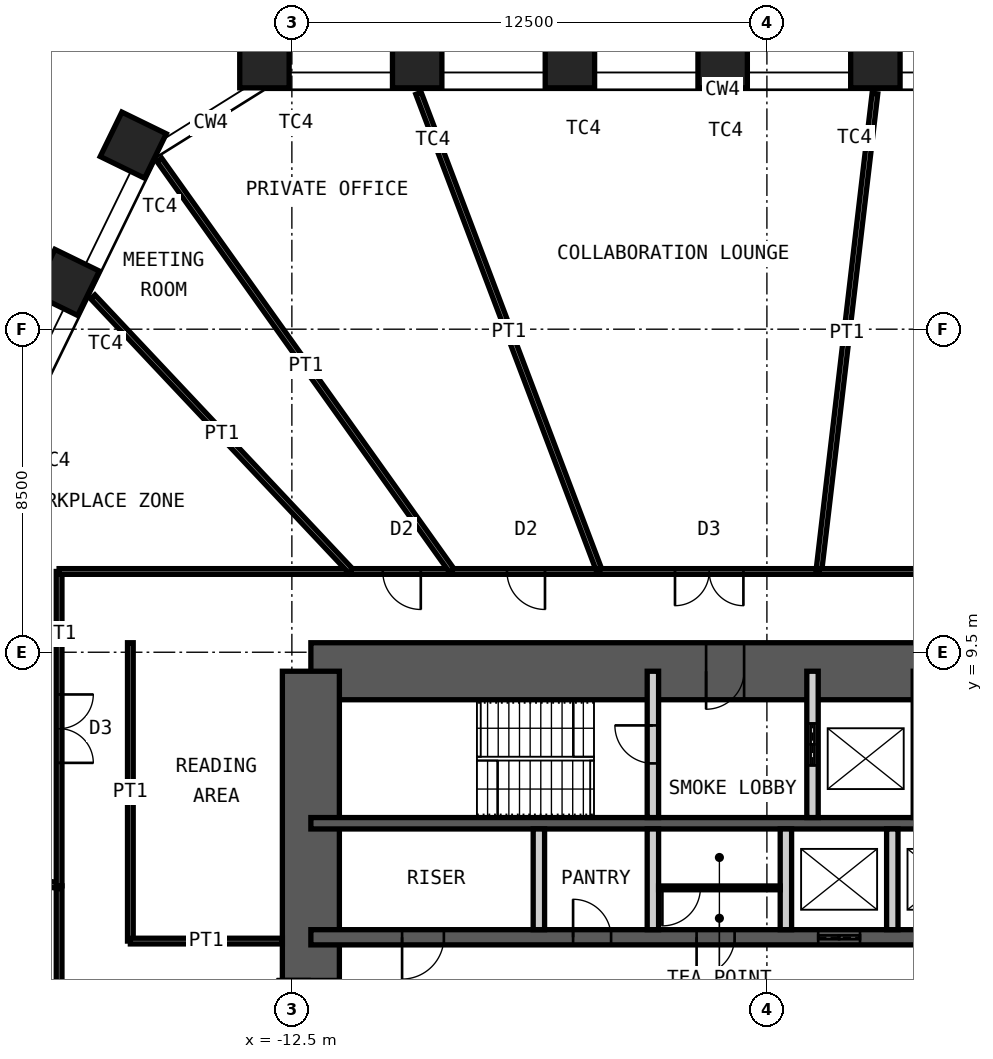
"""IFC4 building model, lengths in metres.
Left out: names, types, materials, properties, quantities, classifications, styles, units other than length and angle.
Written with IfcOpenShell. Run it as: python <this file> out.ifc"""

import sys

from ifc_helpers import new_model, si_unit, direction, frame, frame_2d, origin, origin_2d, place, context, subcontext, project, spatial, rectangle, hollow_rectangle, extrude, element, fill, save


model = new_model("IFC4")
c1 = context("Model", 3, precision=1e-05, world=origin(), true_north=direction((0.0, 1.0)))
c2 = subcontext(c1, "Body", "Model", "MODEL_VIEW")
j1 = project(units=[si_unit("LENGTHUNIT", "METRE"), si_unit("PLANEANGLEUNIT", "RADIAN")], contexts=[c1])
p1 = place(None, origin())
s1 = spatial("IfcSite", under=j1, at=p1, CompositionType="ELEMENT")
p2 = place(p1, origin())
s2 = spatial("IfcBuilding", under=s1, at=p2, CompositionType="ELEMENT")
p3 = place(p2, frame((0.0, 0.0, 149.2)))
s3 = spatial("IfcBuildingStorey", under=s2, at=p3, CompositionType="ELEMENT", Elevation=149.2)
for number, where, z_axis, x_axis in (
    (1, (-13.222, 25.0, 0.0), (0.0, 0.0, 1.0), (-1.0, 0.0, 0.0)),
    (2, (-9.203, 25.0, 0.0), (0.0, 0.0, 1.0), (-1.0, 0.0, 0.0)),
    (3, (-5.184, 25.0, 0.0), (0.0, 0.0, 1.0), (-1.0, 0.0, 0.0)),
    (4, (-1.165, 25.0, 0.0), (0.0, 0.0, 1.0), (-1.0, 0.0, 0.0)),
    (5, (2.854, 25.0, 0.0), (0.0, 0.0, 1.0), (-1.0, 0.0, 0.0)),
    (6, (-18.436, 19.23, 0.0), (0.0, 0.0, 1.0), (-0.438, -0.899, 0.0)),
    (7, (-16.674, 22.843, 0.0), (0.0, 0.0, 1.0), (-0.438, -0.899, 0.0)),
):
    element("IfcColumn", number, at=place(p3, frame(where, z_axis=z_axis, x_axis=x_axis)), inside=s3, PredefinedType="COLUMN", context=c2, shape_type="SweptSolid", body=[
        extrude(hollow_rectangle(XDim=1.3, YDim=1.3, WallThickness=0.1, at=origin_2d()), origin(), (0.0, 0.0, 1.0), 4.2),
    ])
p4 = place(p3, frame((-12.0, 9.0, 0.0), z_axis=(0.0, 0.0, 1.0), x_axis=(1.0, 0.0, 0.0)))
e8 = element("IfcWall", 8, at=p4, inside=s3, PredefinedType="SHEAR", context=c2, shape_type="SweptSolid", body=[
    extrude(rectangle(XDim=24.0, YDim=1.5, at=frame_2d((12.0, 0.0))), origin(), (0.0, 0.0, 1.0), 4.2),
])
p5 = place(p4, frame((10.4, 0.0, 0.0)))
e9 = element("IfcOpeningElement", 9, at=p5, cuts=e8, PredefinedType="OPENING", context=c2, shape_type="SweptSolid", body=[
    extrude(rectangle(XDim=1.0, YDim=2.1, at=frame_2d((0.5, 1.05))), frame((0.0, 0.76, 0.0), z_axis=(0.0, -1.0, 0.0), x_axis=(1.0, 0.0, 0.0)), (0.0, 0.0, 1.0), 1.52),
])
p6 = place(p4, frame((17.6, 0.0, 0.0)))
e10 = element("IfcOpeningElement", 10, at=p6, cuts=e8, PredefinedType="OPENING", context=c2, shape_type="SweptSolid", body=[
    extrude(rectangle(XDim=0.9, YDim=2.1, at=frame_2d((0.45, 1.05))), frame((0.0, 0.76, 0.0), z_axis=(0.0, -1.0, 0.0), x_axis=(1.0, 0.0, 0.0)), (0.0, 0.0, 1.0), 1.52),
])
p7 = place(p4, frame((21.9, 0.0, 0.0)))
e11 = element("IfcOpeningElement", 11, at=p7, cuts=e8, PredefinedType="OPENING", context=c2, shape_type="SweptSolid", body=[
    extrude(rectangle(XDim=0.9, YDim=2.1, at=frame_2d((0.45, 1.05))), frame((0.0, 0.76, 0.0), z_axis=(0.0, -1.0, 0.0), x_axis=(1.0, 0.0, 0.0)), (0.0, 0.0, 1.0), 1.52),
])
p8 = place(p3, frame((-12.0, -9.0, 0.0), z_axis=(0.0, 0.0, 1.0), x_axis=(0.0, 1.0, 0.0)))
e12 = element("IfcWall", 12, at=p8, inside=s3, PredefinedType="SHEAR", context=c2, shape_type="SweptSolid", body=[
    extrude(rectangle(XDim=18.0, YDim=1.5, at=frame_2d((9.0, 0.0))), origin(), (0.0, 0.0, 1.0), 4.2),
])
p9 = place(p8, frame((8.1, 0.0, 0.0)))
e13 = element("IfcOpeningElement", 13, at=p9, cuts=e12, PredefinedType="OPENING", context=c2, shape_type="SweptSolid", body=[
    extrude(rectangle(XDim=1.8, YDim=2.1, at=frame_2d((0.9, 1.05))), frame((0.0, 0.76, 0.0), z_axis=(0.0, -1.0, 0.0), x_axis=(1.0, 0.0, 0.0)), (0.0, 0.0, 1.0), 1.52),
])
p10 = place(p3, frame((-12.0, 5.0, 0.0), z_axis=(0.0, 0.0, 1.0), x_axis=(1.0, 0.0, 0.0)))
e14 = element("IfcWall", 14, at=p10, inside=s3, PredefinedType="SHEAR", context=c2, shape_type="SweptSolid", body=[
    extrude(rectangle(XDim=24.0, YDim=0.3, at=frame_2d((12.0, 0.0))), origin(), (0.0, 0.0, 1.0), 4.2),
])
p11 = place(p3, frame((-12.0, 2.0, 0.0), z_axis=(0.0, 0.0, 1.0), x_axis=(1.0, 0.0, 0.0)))
e15 = element("IfcWall", 15, at=p11, inside=s3, PredefinedType="SHEAR", context=c2, shape_type="SweptSolid", body=[
    extrude(rectangle(XDim=24.0, YDim=0.4, at=frame_2d((12.0, 0.0))), origin(), (0.0, 0.0, 1.0), 4.2),
])
p12 = place(p11, frame((2.4, 0.0, 0.0)))
e16 = element("IfcOpeningElement", 16, at=p12, cuts=e15, PredefinedType="OPENING", context=c2, shape_type="SweptSolid", body=[
    extrude(rectangle(XDim=1.1, YDim=2.1, at=frame_2d((0.55, 1.05))), frame((0.0, 0.21, 0.0), z_axis=(0.0, -1.0, 0.0), x_axis=(1.0, 0.0, 0.0)), (0.0, 0.0, 1.0), 0.42),
])
p13 = place(p11, frame((22.0, 0.0, 0.0)))
e17 = element("IfcOpeningElement", 17, at=p13, cuts=e15, PredefinedType="OPENING", context=c2, shape_type="SweptSolid", body=[
    extrude(rectangle(XDim=1.1, YDim=2.1, at=frame_2d((0.55, 1.05))), frame((0.0, 0.21, 0.0), z_axis=(0.0, -1.0, 0.0), x_axis=(1.0, 0.0, 0.0)), (0.0, 0.0, 1.0), 0.42),
])
p14 = place(p11, frame((10.15, 0.0, 0.0)))
e18 = element("IfcOpeningElement", 18, at=p14, cuts=e15, PredefinedType="OPENING", context=c2, shape_type="SweptSolid", body=[
    extrude(rectangle(XDim=1.0, YDim=2.1, at=frame_2d((0.5, 1.05))), frame((0.0, 0.21, 0.0), z_axis=(0.0, -1.0, 0.0), x_axis=(1.0, 0.0, 0.0)), (0.0, 0.0, 1.0), 0.42),
])
p15 = place(p11, frame((6.9, 0.0, 0.0)))
e19 = element("IfcOpeningElement", 19, at=p15, cuts=e15, PredefinedType="OPENING", context=c2, shape_type="SweptSolid", body=[
    extrude(rectangle(XDim=1.0, YDim=2.1, at=frame_2d((0.5, 1.05))), frame((0.0, 0.21, 0.0), z_axis=(0.0, -1.0, 0.0), x_axis=(1.0, 0.0, 0.0)), (0.0, 0.0, 1.0), 0.42),
])
p16 = place(p11, frame((13.35, 0.0, 0.0)))
e20 = element("IfcOpeningElement", 20, at=p16, cuts=e15, PredefinedType="OPENING", context=c2, shape_type="SweptSolid", body=[
    extrude(rectangle(XDim=1.1, YDim=2.4, at=frame_2d((0.55, 1.2))), frame((0.0, 0.21, 0.0), z_axis=(0.0, -1.0, 0.0), x_axis=(1.0, 0.0, 0.0)), (0.0, 0.0, 1.0), 0.42),
])
p17 = place(p11, frame((16.15, 0.0, 0.0)))
e21 = element("IfcOpeningElement", 21, at=p17, cuts=e15, PredefinedType="OPENING", context=c2, shape_type="SweptSolid", body=[
    extrude(rectangle(XDim=1.1, YDim=2.4, at=frame_2d((0.55, 1.2))), frame((0.0, 0.21, 0.0), z_axis=(0.0, -1.0, 0.0), x_axis=(1.0, 0.0, 0.0)), (0.0, 0.0, 1.0), 0.42),
])
p18 = place(p11, frame((18.95, 0.0, 0.0)))
e22 = element("IfcOpeningElement", 22, at=p18, cuts=e15, PredefinedType="OPENING", context=c2, shape_type="SweptSolid", body=[
    extrude(rectangle(XDim=1.1, YDim=2.4, at=frame_2d((0.55, 1.2))), frame((0.0, 0.21, 0.0), z_axis=(0.0, -1.0, 0.0), x_axis=(1.0, 0.0, 0.0)), (0.0, 0.0, 1.0), 0.42),
])
p19 = place(p3, frame((-3.0, 5.15, 0.0), z_axis=(0.0, 0.0, 1.0), x_axis=(0.0, 1.0, 0.0)))
e23 = element("IfcWall", 23, at=p19, inside=s3, PredefinedType="PARTITIONING", context=c2, shape_type="SweptSolid", body=[
    extrude(rectangle(XDim=3.85, YDim=0.3, at=frame_2d((1.925, 0.0))), origin(), (0.0, 0.0, 1.0), 3.98),
])
p20 = place(p19, frame((1.425, 0.0, 0.0)))
e24 = element("IfcOpeningElement", 24, at=p20, cuts=e23, PredefinedType="OPENING", context=c2, shape_type="SweptSolid", body=[
    extrude(rectangle(XDim=1.0, YDim=2.1, at=frame_2d((0.5, 1.05))), frame((0.0, 0.16, 0.0), z_axis=(0.0, -1.0, 0.0), x_axis=(1.0, 0.0, 0.0)), (0.0, 0.0, 1.0), 0.32),
])
p21 = place(p3, frame((1.2, 5.15, 0.0), z_axis=(0.0, 0.0, 1.0), x_axis=(0.0, 1.0, 0.0)))
e25 = element("IfcWall", 25, at=p21, inside=s3, PredefinedType="PARTITIONING", context=c2, shape_type="SweptSolid", body=[
    extrude(rectangle(XDim=3.85, YDim=0.3, at=frame_2d((1.925, 0.0))), origin(), (0.0, 0.0, 1.0), 3.98),
])
p22 = place(p21, frame((1.375, 0.0, 0.0)))
e26 = element("IfcOpeningElement", 26, at=p22, cuts=e25, PredefinedType="OPENING", context=c2, shape_type="SweptSolid", body=[
    extrude(rectangle(XDim=1.1, YDim=2.4, at=frame_2d((0.55, 1.2))), frame((0.0, 0.16, 0.0), z_axis=(0.0, -1.0, 0.0), x_axis=(1.0, 0.0, 0.0)), (0.0, 0.0, 1.0), 0.32),
])
p23 = place(p3, frame((4.0, 5.15, 0.0), z_axis=(0.0, 0.0, 1.0), x_axis=(0.0, 1.0, 0.0)))
e27 = element("IfcWall", 27, at=p23, inside=s3, PredefinedType="PARTITIONING", context=c2, shape_type="SweptSolid", body=[
    extrude(rectangle(XDim=3.85, YDim=0.3, at=frame_2d((1.925, 0.0))), origin(), (0.0, 0.0, 1.0), 3.98),
])
for number, where, z_axis, x_axis in (
    (28, (-6.0, 2.2, 0.0), (0.0, 0.0, 1.0), (0.0, 1.0, 0.0)),
    (29, (-3.0, 2.2, 0.0), (0.0, 0.0, 1.0), (0.0, 1.0, 0.0)),
    (30, (0.5, 2.2, 0.0), (0.0, 0.0, 1.0), (0.0, 1.0, 0.0)),
    (31, (3.3, 2.2, 0.0), (0.0, 0.0, 1.0), (0.0, 1.0, 0.0)),
):
    element("IfcWall", number, at=place(p3, frame(where, z_axis=z_axis, x_axis=x_axis)), inside=s3, PredefinedType="PARTITIONING", context=c2, shape_type="SweptSolid", body=[
        extrude(rectangle(XDim=2.65, YDim=0.3, at=frame_2d((1.325, 0.0))), origin(), (0.0, 0.0, 1.0), 3.98),
    ])
p24 = place(p3, frame((-2.85, 3.3, 0.0), z_axis=(0.0, 0.0, 1.0), x_axis=(1.0, 0.0, 0.0)))
e32 = element("IfcWall", 32, at=p24, inside=s3, PredefinedType="PARTITIONING", context=c2, shape_type="SweptSolid", body=[
    extrude(rectangle(XDim=3.2, YDim=0.1, at=frame_2d((1.6, 0.0))), origin(), (0.0, 0.0, 1.0), 3.98),
])
p25 = place(p24, frame((0.1, 0.0, 0.0)))
e33 = element("IfcOpeningElement", 33, at=p25, cuts=e32, PredefinedType="OPENING", context=c2, shape_type="SweptSolid", body=[
    extrude(rectangle(XDim=1.0, YDim=2.4, at=frame_2d((0.5, 1.2))), frame((0.0, 0.06, 0.0), z_axis=(0.0, -1.0, 0.0), x_axis=(1.0, 0.0, 0.0)), (0.0, 0.0, 1.0), 0.12),
])
p26 = place(p3, frame((-18.625, -4.715, 0.0), z_axis=(0.0, 0.0, 1.0), x_axis=(0.0, 1.0, 0.0)))
e34 = element("IfcWall", 34, at=p26, inside=s3, PredefinedType="PARTITIONING", context=c2, shape_type="SweptSolid", body=[
    extrude(rectangle(XDim=8.068, YDim=0.15, at=frame_2d((4.034, 0.0))), origin(), (0.0, 0.0, 1.0), 4.03),
])
p27 = place(p26, frame((3.534, 0.0, 0.0)))
e35 = element("IfcOpeningElement", 35, at=p27, cuts=e34, PredefinedType="OPENING", context=c2, shape_type="SweptSolid", body=[
    extrude(rectangle(XDim=1.0, YDim=2.4, at=frame_2d((0.5, 1.2))), frame((0.0, 0.085, 0.0), z_axis=(0.0, -1.0, 0.0), x_axis=(1.0, 0.0, 0.0)), (0.0, 0.0, 1.0), 0.17),
])
p28 = place(p3, frame((-24.755, 4.457, 0.0), z_axis=(0.0, 0.0, 1.0), x_axis=(0.984175122587, -0.177198555524, 0.0)))
e36 = element("IfcWall", 36, at=p28, inside=s3, PredefinedType="PARTITIONING", context=c2, shape_type="SweptSolid", body=[
    extrude(rectangle(XDim=6.229, YDim=0.15, at=frame_2d((3.115, 0.0))), origin(), (0.0, 0.0, 1.0), 3.33),
])
p29 = place(p3, frame((-18.625, 3.353, 0.0), z_axis=(0.0, 0.0, 1.0), x_axis=(0.0, 1.0, 0.0)))
e37 = element("IfcWall", 37, at=p29, inside=s3, PredefinedType="PARTITIONING", context=c2, shape_type="SweptSolid", body=[
    extrude(rectangle(XDim=8.272, YDim=0.15, at=frame_2d((4.136, 0.0))), origin(), (0.0, 0.0, 1.0), 4.03),
])
p30 = place(p29, frame((3.236, 0.0, 0.0)))
e38 = element("IfcOpeningElement", 38, at=p30, cuts=e37, PredefinedType="OPENING", context=c2, shape_type="SweptSolid", body=[
    extrude(rectangle(XDim=1.8, YDim=2.4, at=frame_2d((0.9, 1.2))), frame((0.0, 0.085, 0.0), z_axis=(0.0, -1.0, 0.0), x_axis=(1.0, 0.0, 0.0)), (0.0, 0.0, 1.0), 0.17),
])
p31 = place(p3, frame((-18.625, 11.625, 0.0), z_axis=(0.0, 0.0, 1.0), x_axis=(1.0, 0.0, 0.0)))
e39 = element("IfcWall", 39, at=p31, inside=s3, PredefinedType="PARTITIONING", context=c2, shape_type="SweptSolid", body=[
    extrude(rectangle(XDim=7.686, YDim=0.15, at=frame_2d((3.843, 0.0))), origin(), (0.0, 0.0, 1.0), 4.03),
])
p32 = place(p3, frame((-17.738, 18.851, 0.0), z_axis=(0.0, 0.0, 1.0), x_axis=(0.685286406267, -0.728273672039, 0.0)))
e40 = element("IfcWall", 40, at=p32, inside=s3, PredefinedType="PARTITIONING", context=c2, shape_type="SweptSolid", body=[
    extrude(rectangle(XDim=9.922, YDim=0.15, at=frame_2d((4.961, 0.0))), origin(), (0.0, 0.0, 1.0), 3.33),
])
p33 = place(p3, frame((-10.939, 11.625, 0.0), z_axis=(0.0, 0.0, 1.0), x_axis=(1.0, 0.0, 0.0)))
e41 = element("IfcWall", 41, at=p33, inside=s3, PredefinedType="PARTITIONING", context=c2, shape_type="SweptSolid", body=[
    extrude(rectangle(XDim=2.662, YDim=0.15, at=frame_2d((1.331, 0.0))), origin(), (0.0, 0.0, 1.0), 4.03),
])
p34 = place(p33, frame((0.831, 0.0, 0.0)))
e42 = element("IfcOpeningElement", 42, at=p34, cuts=e41, PredefinedType="OPENING", context=c2, shape_type="SweptSolid", body=[
    extrude(rectangle(XDim=1.0, YDim=2.4, at=frame_2d((0.5, 1.2))), frame((0.0, 0.085, 0.0), z_axis=(0.0, -1.0, 0.0), x_axis=(1.0, 0.0, 0.0)), (0.0, 0.0, 1.0), 0.17),
])
p35 = place(p3, frame((-15.987, 22.455, 0.0), z_axis=(0.0, 0.0, 1.0), x_axis=(0.579969304452, -0.814638328274, 0.0)))
e43 = element("IfcWall", 43, at=p35, inside=s3, PredefinedType="PARTITIONING", context=c2, shape_type="SweptSolid", body=[
    extrude(rectangle(XDim=13.294, YDim=0.15, at=frame_2d((6.647, 0.0))), origin(), (0.0, 0.0, 1.0), 2.93),
])
p36 = place(p3, frame((-8.277, 11.625, 0.0), z_axis=(0.0, 0.0, 1.0), x_axis=(1.0, 0.0, 0.0)))
e44 = element("IfcWall", 44, at=p36, inside=s3, PredefinedType="PARTITIONING", context=c2, shape_type="SweptSolid", body=[
    extrude(rectangle(XDim=3.874, YDim=0.15, at=frame_2d((1.937, 0.0))), origin(), (0.0, 0.0, 1.0), 4.03),
])
p37 = place(p36, frame((1.437, 0.0, 0.0)))
e45 = element("IfcOpeningElement", 45, at=p37, cuts=e44, PredefinedType="OPENING", context=c2, shape_type="SweptSolid", body=[
    extrude(rectangle(XDim=1.0, YDim=2.4, at=frame_2d((0.5, 1.2))), frame((0.0, 0.085, 0.0), z_axis=(0.0, -1.0, 0.0), x_axis=(1.0, 0.0, 0.0)), (0.0, 0.0, 1.0), 0.17),
])
p38 = place(p3, frame((-9.167, 24.207, 0.0), z_axis=(0.0, 0.0, 1.0), x_axis=(0.354156368181, -0.935186220427, 0.0)))
e46 = element("IfcWall", 46, at=p38, inside=s3, PredefinedType="PARTITIONING", context=c2, shape_type="SweptSolid", body=[
    extrude(rectangle(XDim=13.454, YDim=0.15, at=frame_2d((6.727, 0.0))), origin(), (0.0, 0.0, 1.0), 3.33),
])
p39 = place(p3, frame((-4.403, 11.625, 0.0), z_axis=(0.0, 0.0, 1.0), x_axis=(1.0, 0.0, 0.0)))
e47 = element("IfcWall", 47, at=p39, inside=s3, PredefinedType="PARTITIONING", context=c2, shape_type="SweptSolid", body=[
    extrude(rectangle(XDim=5.768, YDim=0.15, at=frame_2d((2.884, 0.0))), origin(), (0.0, 0.0, 1.0), 4.03),
])
p40 = place(p39, frame((1.984, 0.0, 0.0)))
e48 = element("IfcOpeningElement", 48, at=p40, cuts=e47, PredefinedType="OPENING", context=c2, shape_type="SweptSolid", body=[
    extrude(rectangle(XDim=1.8, YDim=2.4, at=frame_2d((0.9, 1.2))), frame((0.0, 0.085, 0.0), z_axis=(0.0, -1.0, 0.0), x_axis=(1.0, 0.0, 0.0)), (0.0, 0.0, 1.0), 0.17),
])
p41 = place(p3, frame((2.843, 24.201, 0.0), z_axis=(0.0, 0.0, 1.0), x_axis=(-0.116670084723, -0.993170726175, 0.0)))
e49 = element("IfcWall", 49, at=p41, inside=s3, PredefinedType="PARTITIONING", context=c2, shape_type="SweptSolid", body=[
    extrude(rectangle(XDim=12.662, YDim=0.15, at=frame_2d((6.331, 0.0))), origin(), (0.0, 0.0, 1.0), 3.33),
])
p42 = place(p3, frame((1.366, 11.625, 0.0), z_axis=(0.0, 0.0, 1.0), x_axis=(1.0, 0.0, 0.0)))
e50 = element("IfcWall", 50, at=p42, inside=s3, PredefinedType="PARTITIONING", context=c2, shape_type="SweptSolid", body=[
    extrude(rectangle(XDim=8.46, YDim=0.15, at=frame_2d((4.23, 0.0))), origin(), (0.0, 0.0, 1.0), 4.03),
])
p43 = place(p42, frame((3.33, 0.0, 0.0)))
e51 = element("IfcOpeningElement", 51, at=p43, cuts=e50, PredefinedType="OPENING", context=c2, shape_type="SweptSolid", body=[
    extrude(rectangle(XDim=1.8, YDim=2.4, at=frame_2d((0.9, 1.2))), frame((0.0, 0.085, 0.0), z_axis=(0.0, -1.0, 0.0), x_axis=(1.0, 0.0, 0.0)), (0.0, 0.0, 1.0), 0.17),
])
p44 = place(p3, frame((-16.75, 1.9, 0.0), z_axis=(0.0, 0.0, 1.0), x_axis=(0.0, 1.0, 0.0)))
e52 = element("IfcWall", 52, at=p44, inside=s3, PredefinedType="PARTITIONING", context=c2, shape_type="SweptSolid", body=[
    extrude(rectangle(XDim=7.85, YDim=0.15, at=frame_2d((3.925, 0.0))), origin(), (0.0, 0.0, 1.0), 4.03),
])
p45 = place(p3, frame((-12.75, 1.9, 0.0), z_axis=(0.0, 0.0, 1.0), x_axis=(-1.0, 0.0, 0.0)))
e53 = element("IfcWall", 53, at=p45, inside=s3, PredefinedType="PARTITIONING", context=c2, shape_type="SweptSolid", body=[
    extrude(rectangle(XDim=4.0, YDim=0.15, at=frame_2d((2.0, 0.0))), origin(), (0.0, 0.0, 1.0), 3.33),
])
p46 = place(p5, origin())
e54 = element("IfcDoor", 54, at=p46, inside=s3, OperationType="SINGLE_SWING_LEFT", PredefinedType="DOOR", context=c2, shape_type="SweptSolid", body=[
    extrude(rectangle(XDim=1.0, YDim=2.1, at=frame_2d((0.5, 1.05))), frame((0.0, 0.025, 0.0), z_axis=(0.0, -1.0, 0.0), x_axis=(1.0, 0.0, 0.0)), (0.0, 0.0, 1.0), 0.05),
])
fill(e9, e54)
p47 = place(p20, origin())
e55 = element("IfcDoor", 55, at=p47, inside=s3, OperationType="SINGLE_SWING_LEFT", PredefinedType="DOOR", context=c2, shape_type="SweptSolid", body=[
    extrude(rectangle(XDim=1.0, YDim=2.1, at=frame_2d((0.5, 1.05))), frame((0.0, 0.025, 0.0), z_axis=(0.0, -1.0, 0.0), x_axis=(1.0, 0.0, 0.0)), (0.0, 0.0, 1.0), 0.05),
])
fill(e24, e55)
p48 = place(p12, origin())
e56 = element("IfcDoor", 56, at=p48, inside=s3, OperationType="SINGLE_SWING_LEFT", PredefinedType="DOOR", context=c2, shape_type="SweptSolid", body=[
    extrude(rectangle(XDim=1.1, YDim=2.1, at=frame_2d((0.55, 1.05))), frame((0.0, 0.025, 0.0), z_axis=(0.0, -1.0, 0.0), x_axis=(1.0, 0.0, 0.0)), (0.0, 0.0, 1.0), 0.05),
])
fill(e16, e56)
p49 = place(p14, origin())
e57 = element("IfcDoor", 57, at=p49, inside=s3, OperationType="SINGLE_SWING_LEFT", PredefinedType="DOOR", context=c2, shape_type="SweptSolid", body=[
    extrude(rectangle(XDim=1.0, YDim=2.1, at=frame_2d((0.5, 1.05))), frame((0.0, 0.025, 0.0), z_axis=(0.0, -1.0, 0.0), x_axis=(1.0, 0.0, 0.0)), (0.0, 0.0, 1.0), 0.05),
])
fill(e18, e57)
p50 = place(p9, origin())
e58 = element("IfcDoor", 58, at=p50, inside=s3, OperationType="DOUBLE_DOOR_DOUBLE_SWING", PredefinedType="DOOR", context=c2, shape_type="SweptSolid", body=[
    extrude(rectangle(XDim=1.8, YDim=2.1, at=frame_2d((0.9, 1.05))), frame((0.0, 0.025, 0.0), z_axis=(0.0, -1.0, 0.0), x_axis=(1.0, 0.0, 0.0)), (0.0, 0.0, 1.0), 0.05),
])
fill(e13, e58)
p51 = place(p22, origin())
e59 = element("IfcDoor", 59, at=p51, inside=s3, OperationType="DOUBLE_DOOR_SLIDING", PredefinedType="DOOR", context=c2, shape_type="SweptSolid", body=[
    extrude(rectangle(XDim=1.1, YDim=2.4, at=frame_2d((0.55, 1.2))), frame((0.0, 0.025, 0.0), z_axis=(0.0, -1.0, 0.0), x_axis=(1.0, 0.0, 0.0)), (0.0, 0.0, 1.0), 0.05),
])
fill(e26, e59)
p52 = place(p15, origin())
e60 = element("IfcDoor", 60, at=p52, inside=s3, OperationType="SINGLE_SWING_RIGHT", PredefinedType="DOOR", context=c2, shape_type="SweptSolid", body=[
    extrude(rectangle(XDim=1.0, YDim=2.1, at=frame_2d((0.5, 1.05))), frame((0.0, 0.025, 0.0), z_axis=(0.0, -1.0, 0.0), x_axis=(1.0, 0.0, 0.0)), (0.0, 0.0, 1.0), 0.05),
])
fill(e19, e60)
p53 = place(p16, origin())
e61 = element("IfcDoor", 61, at=p53, inside=s3, OperationType="DOUBLE_DOOR_SLIDING", PredefinedType="DOOR", context=c2, shape_type="SweptSolid", body=[
    extrude(rectangle(XDim=1.1, YDim=2.4, at=frame_2d((0.55, 1.2))), frame((0.0, 0.025, 0.0), z_axis=(0.0, -1.0, 0.0), x_axis=(1.0, 0.0, 0.0)), (0.0, 0.0, 1.0), 0.05),
])
fill(e20, e61)
p54 = place(p25, origin())
e62 = element("IfcDoor", 62, at=p54, inside=s3, OperationType="SINGLE_SWING_LEFT", PredefinedType="DOOR", context=c2, shape_type="SweptSolid", body=[
    extrude(rectangle(XDim=1.0, YDim=2.4, at=frame_2d((0.5, 1.2))), frame((0.0, 0.025, 0.0), z_axis=(0.0, -1.0, 0.0), x_axis=(1.0, 0.0, 0.0)), (0.0, 0.0, 1.0), 0.05),
])
fill(e33, e62)
p55 = place(p30, origin())
e63 = element("IfcDoor", 63, at=p55, inside=s3, OperationType="DOUBLE_DOOR_DOUBLE_SWING", PredefinedType="DOOR", context=c2, shape_type="SweptSolid", body=[
    extrude(rectangle(XDim=1.8, YDim=2.4, at=frame_2d((0.9, 1.2))), frame((0.0, 0.025, 0.0), z_axis=(0.0, -1.0, 0.0), x_axis=(1.0, 0.0, 0.0)), (0.0, 0.0, 1.0), 0.05),
])
fill(e38, e63)
p56 = place(p34, origin())
e64 = element("IfcDoor", 64, at=p56, inside=s3, OperationType="SINGLE_SWING_RIGHT", PredefinedType="DOOR", context=c2, shape_type="SweptSolid", body=[
    extrude(rectangle(XDim=1.0, YDim=2.4, at=frame_2d((0.5, 1.2))), frame((0.0, 0.025, 0.0), z_axis=(0.0, -1.0, 0.0), x_axis=(1.0, 0.0, 0.0)), (0.0, 0.0, 1.0), 0.05),
])
fill(e42, e64)
p57 = place(p37, origin())
e65 = element("IfcDoor", 65, at=p57, inside=s3, OperationType="SINGLE_SWING_RIGHT", PredefinedType="DOOR", context=c2, shape_type="SweptSolid", body=[
    extrude(rectangle(XDim=1.0, YDim=2.4, at=frame_2d((0.5, 1.2))), frame((0.0, 0.025, 0.0), z_axis=(0.0, -1.0, 0.0), x_axis=(1.0, 0.0, 0.0)), (0.0, 0.0, 1.0), 0.05),
])
fill(e45, e65)
p58 = place(p40, origin())
e66 = element("IfcDoor", 66, at=p58, inside=s3, OperationType="DOUBLE_DOOR_DOUBLE_SWING", PredefinedType="DOOR", context=c2, shape_type="SweptSolid", body=[
    extrude(rectangle(XDim=1.8, YDim=2.4, at=frame_2d((0.9, 1.2))), frame((0.0, 0.025, 0.0), z_axis=(0.0, -1.0, 0.0), x_axis=(1.0, 0.0, 0.0)), (0.0, 0.0, 1.0), 0.05),
])
fill(e48, e66)
save(model, sys.argv[1])
